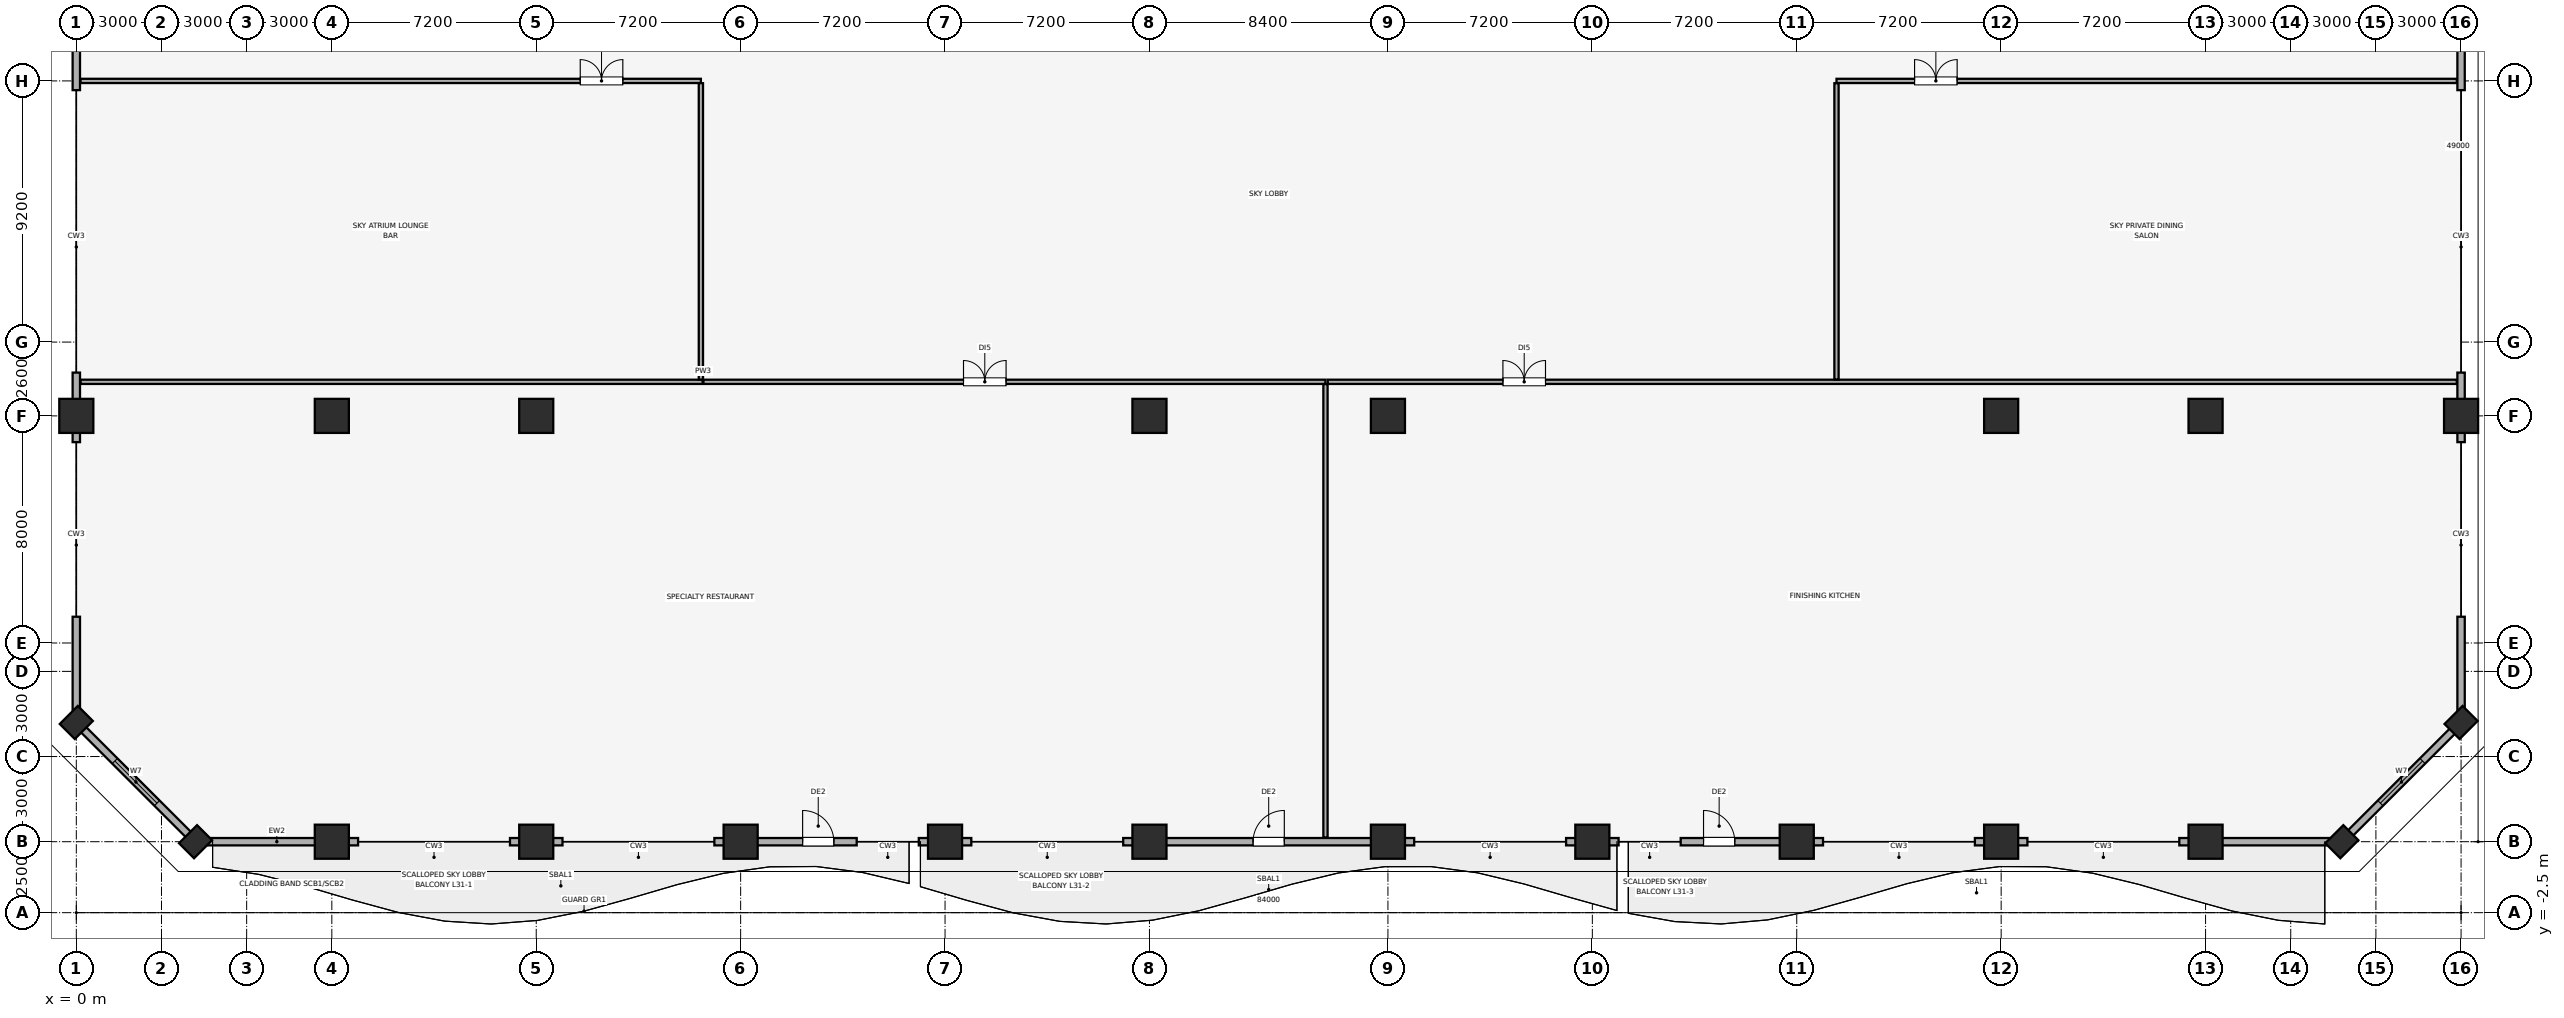
"""IFC4 building model, lengths in metres.
Left out: names, types, materials, properties, quantities, classifications, styles, units other than length and angle.
Written with IfcOpenShell. Run it as: python <this file> out.ifc"""

import sys

from ifc_helpers import new_model, si_unit, direction, frame, frame_2d, origin, origin_2d, place, context, subcontext, project, spatial, rectangle, extrude, element, fill, save


model = new_model("IFC4")
c1 = context("Model", 3, precision=1e-05, world=origin(), true_north=direction((0.0, 1.0)))
c2 = subcontext(c1, "Body", "Model", "MODEL_VIEW")
j1 = project(units=[si_unit("LENGTHUNIT", "METRE"), si_unit("PLANEANGLEUNIT", "RADIAN")], contexts=[c1])
p1 = place(None, origin())
s1 = spatial("IfcSite", under=j1, at=p1, CompositionType="ELEMENT")
p2 = place(p1, origin())
s2 = spatial("IfcBuilding", under=s1, at=p2, CompositionType="ELEMENT")
p3 = place(p2, frame((0.0, 0.0, 130.55)))
s3 = spatial("IfcBuildingStorey", under=s2, at=p3, CompositionType="ELEMENT", Elevation=130.55)
for number, where, z_axis, x_axis in (
    (1, (9.0, 0.0, 0.0), (0.0, 0.0, 1.0), (1.0, 0.0, 0.0)),
    (2, (16.2, 0.0, 0.0), (0.0, 0.0, 1.0), (1.0, 0.0, 0.0)),
    (3, (23.4, 0.0, 0.0), (0.0, 0.0, 1.0), (1.0, 0.0, 0.0)),
    (4, (30.6, 0.0, 0.0), (0.0, 0.0, 1.0), (1.0, 0.0, 0.0)),
    (5, (37.8, 0.0, 0.0), (0.0, 0.0, 1.0), (1.0, 0.0, 0.0)),
    (6, (46.2, 0.0, 0.0), (0.0, 0.0, 1.0), (1.0, 0.0, 0.0)),
    (7, (53.4, 0.0, 0.0), (0.0, 0.0, 1.0), (1.0, 0.0, 0.0)),
    (8, (60.6, 0.0, 0.0), (0.0, 0.0, 1.0), (1.0, 0.0, 0.0)),
    (9, (67.8, 0.0, 0.0), (0.0, 0.0, 1.0), (1.0, 0.0, 0.0)),
    (10, (75.0, 0.0, 0.0), (0.0, 0.0, 1.0), (1.0, 0.0, 0.0)),
    (11, (0.0, 15.0, 0.0), (0.0, 0.0, 1.0), (1.0, 0.0, 0.0)),
    (12, (84.0, 15.0, 0.0), (0.0, 0.0, 1.0), (1.0, 0.0, 0.0)),
):
    element("IfcColumn", number, at=place(p3, frame(where, z_axis=z_axis, x_axis=x_axis)), inside=s3, PredefinedType="COLUMN", context=c2, shape_type="SweptSolid", body=[
        extrude(rectangle(XDim=1.2, YDim=1.2, at=origin_2d()), origin(), (0.0, 0.0, 1.0), 4.56),
    ])
for number, where, z_axis, x_axis in (
    (13, (4.2, 0.0, 0.0), (0.0, 0.0, 1.0), (0.707, 0.707, 0.0)),
    (14, (79.8, 0.0, 0.0), (0.0, 0.0, 1.0), (0.707, 0.707, 0.0)),
    (15, (84.0, 4.2, 0.0), (0.0, 0.0, 1.0), (0.707, 0.707, 0.0)),
    (16, (0.0, 4.2, 0.0), (0.0, 0.0, 1.0), (0.707, 0.707, 0.0)),
):
    element("IfcColumn", number, at=place(p3, frame(where, z_axis=z_axis, x_axis=x_axis)), inside=s3, PredefinedType="PILASTER", context=c2, shape_type="SweptSolid", body=[
        extrude(rectangle(XDim=0.9, YDim=0.75, at=origin_2d()), origin(), (0.0, 0.0, 1.0), 4.56),
    ])
for number, where, z_axis, x_axis in (
    (17, (9.0, 15.0, 0.0), (0.0, 0.0, 1.0), (1.0, 0.0, 0.0)),
    (18, (16.2, 15.0, 0.0), (0.0, 0.0, 1.0), (1.0, 0.0, 0.0)),
    (19, (37.8, 15.0, 0.0), (0.0, 0.0, 1.0), (1.0, 0.0, 0.0)),
    (20, (46.2, 15.0, 0.0), (0.0, 0.0, 1.0), (1.0, 0.0, 0.0)),
    (21, (67.8, 15.0, 0.0), (0.0, 0.0, 1.0), (1.0, 0.0, 0.0)),
    (22, (75.0, 15.0, 0.0), (0.0, 0.0, 1.0), (1.0, 0.0, 0.0)),
):
    element("IfcColumn", number, at=place(p3, frame(where, z_axis=z_axis, x_axis=x_axis)), inside=s3, PredefinedType="COLUMN", context=c2, shape_type="SweptSolid", body=[
        extrude(rectangle(XDim=1.2, YDim=1.2, at=origin_2d()), origin(), (0.0, 0.0, 1.0), 4.56),
    ])
p4 = place(p3, frame((4.2, 0.0, 0.0), z_axis=(0.0, 0.0, 1.0), x_axis=(1.0, 0.0, 0.0)))
e23 = element("IfcWall", 23, at=p4, inside=s3, PredefinedType="SOLIDWALL", context=c2, shape_type="SweptSolid", body=[
    extrude(rectangle(XDim=5.725, YDim=0.26, at=frame_2d((2.863, 0.0))), origin(), (0.0, 0.0, 1.0), 3.4),
])
p5 = place(p3, frame((15.275, 0.0, 0.0), z_axis=(0.0, 0.0, 1.0), x_axis=(1.0, 0.0, 0.0)))
e24 = element("IfcWall", 24, at=p5, inside=s3, PredefinedType="SOLIDWALL", context=c2, shape_type="SweptSolid", body=[
    extrude(rectangle(XDim=1.85, YDim=0.26, at=frame_2d((0.925, 0.0))), origin(), (0.0, 0.0, 1.0), 4.52),
])
p6 = place(p3, frame((22.475, 0.0, 0.0), z_axis=(0.0, 0.0, 1.0), x_axis=(1.0, 0.0, 0.0)))
e25 = element("IfcWall", 25, at=p6, inside=s3, PredefinedType="SOLIDWALL", context=c2, shape_type="SweptSolid", body=[
    extrude(rectangle(XDim=5.013, YDim=0.26, at=frame_2d((2.507, 0.0))), origin(), (0.0, 0.0, 1.0), 3.4),
])
p7 = place(p6, frame((3.108, 0.0, 0.0)))
e26 = element("IfcOpeningElement", 26, at=p7, cuts=e25, PredefinedType="OPENING", context=c2, shape_type="SweptSolid", body=[
    extrude(rectangle(XDim=1.1, YDim=2.15, at=frame_2d((0.55, 1.075))), frame((0.0, 0.14, 0.0), z_axis=(0.0, -1.0, 0.0), x_axis=(1.0, 0.0, 0.0)), (0.0, 0.0, 1.0), 0.28),
])
p8 = place(p3, frame((29.675, 0.0, 0.0), z_axis=(0.0, 0.0, 1.0), x_axis=(1.0, 0.0, 0.0)))
e27 = element("IfcWall", 27, at=p8, inside=s3, PredefinedType="SOLIDWALL", context=c2, shape_type="SweptSolid", body=[
    extrude(rectangle(XDim=1.85, YDim=0.26, at=frame_2d((0.925, 0.0))), origin(), (0.0, 0.0, 1.0), 4.52),
])
p9 = place(p3, frame((36.875, 0.0, 0.0), z_axis=(0.0, 0.0, 1.0), x_axis=(1.0, 0.0, 0.0)))
e28 = element("IfcWall", 28, at=p9, inside=s3, PredefinedType="SOLIDWALL", context=c2, shape_type="SweptSolid", body=[
    extrude(rectangle(XDim=10.25, YDim=0.26, at=frame_2d((5.125, 0.0))), origin(), (0.0, 0.0, 1.0), 3.4),
])
p10 = place(p9, frame((4.575, 0.0, 0.0)))
e29 = element("IfcOpeningElement", 29, at=p10, cuts=e28, PredefinedType="OPENING", context=c2, shape_type="SweptSolid", body=[
    extrude(rectangle(XDim=1.1, YDim=2.15, at=frame_2d((0.55, 1.075))), frame((0.0, 0.14, 0.0), z_axis=(0.0, -1.0, 0.0), x_axis=(1.0, 0.0, 0.0)), (0.0, 0.0, 1.0), 0.28),
])
p11 = place(p3, frame((52.475, 0.0, 0.0), z_axis=(0.0, 0.0, 1.0), x_axis=(1.0, 0.0, 0.0)))
e30 = element("IfcWall", 30, at=p11, inside=s3, PredefinedType="SOLIDWALL", context=c2, shape_type="SweptSolid", body=[
    extrude(rectangle(XDim=1.85, YDim=0.26, at=frame_2d((0.925, 0.0))), origin(), (0.0, 0.0, 1.0), 4.52),
])
p12 = place(p3, frame((56.512, 0.0, 0.0), z_axis=(0.0, 0.0, 1.0), x_axis=(1.0, 0.0, 0.0)))
e31 = element("IfcWall", 31, at=p12, inside=s3, PredefinedType="SOLIDWALL", context=c2, shape_type="SweptSolid", body=[
    extrude(rectangle(XDim=5.013, YDim=0.26, at=frame_2d((2.507, 0.0))), origin(), (0.0, 0.0, 1.0), 3.4),
])
p13 = place(p12, frame((0.805, 0.0, 0.0)))
e32 = element("IfcOpeningElement", 32, at=p13, cuts=e31, PredefinedType="OPENING", context=c2, shape_type="SweptSolid", body=[
    extrude(rectangle(XDim=1.1, YDim=2.15, at=frame_2d((0.55, 1.075))), frame((0.0, 0.14, 0.0), z_axis=(0.0, -1.0, 0.0), x_axis=(1.0, 0.0, 0.0)), (0.0, 0.0, 1.0), 0.28),
])
p14 = place(p3, frame((66.875, 0.0, 0.0), z_axis=(0.0, 0.0, 1.0), x_axis=(1.0, 0.0, 0.0)))
e33 = element("IfcWall", 33, at=p14, inside=s3, PredefinedType="SOLIDWALL", context=c2, shape_type="SweptSolid", body=[
    extrude(rectangle(XDim=1.85, YDim=0.26, at=frame_2d((0.925, 0.0))), origin(), (0.0, 0.0, 1.0), 4.52),
])
p15 = place(p3, frame((74.075, 0.0, 0.0), z_axis=(0.0, 0.0, 1.0), x_axis=(1.0, 0.0, 0.0)))
e34 = element("IfcWall", 34, at=p15, inside=s3, PredefinedType="SOLIDWALL", context=c2, shape_type="SweptSolid", body=[
    extrude(rectangle(XDim=5.725, YDim=0.26, at=frame_2d((2.863, 0.0))), origin(), (0.0, 0.0, 1.0), 3.4),
])
p16 = place(p3, frame((79.8, 0.0, 0.0), z_axis=(0.0, 0.0, 1.0), x_axis=(0.707106781187, 0.707106781187, 0.0)))
e35 = element("IfcWall", 35, at=p16, inside=s3, PredefinedType="SOLIDWALL", context=c2, shape_type="SweptSolid", body=[
    extrude(rectangle(XDim=5.94, YDim=0.26, at=frame_2d((2.97, 0.0))), origin(), (0.0, 0.0, 1.0), 4.52),
])
p17 = place(p16, frame((1.92, 0.0, 0.85)))
e36 = element("IfcOpeningElement", 36, at=p17, cuts=e35, PredefinedType="OPENING", context=c2, shape_type="SweptSolid", body=[
    extrude(rectangle(XDim=2.1, YDim=1.6, at=frame_2d((1.05, 0.8))), frame((0.0, 0.14, 0.0), z_axis=(0.0, -1.0, 0.0), x_axis=(1.0, 0.0, 0.0)), (0.0, 0.0, 1.0), 0.28),
])
p18 = place(p3, frame((84.0, 4.2, 0.0), z_axis=(0.0, 0.0, 1.0), x_axis=(0.0, 1.0, 0.0)))
e37 = element("IfcWall", 37, at=p18, inside=s3, PredefinedType="SOLIDWALL", context=c2, shape_type="SweptSolid", body=[
    extrude(rectangle(XDim=3.725, YDim=0.26, at=frame_2d((1.863, 0.0))), origin(), (0.0, 0.0, 1.0), 4.52),
])
p19 = place(p3, frame((84.0, 14.075, 0.0), z_axis=(0.0, 0.0, 1.0), x_axis=(0.0, 1.0, 0.0)))
e38 = element("IfcWall", 38, at=p19, inside=s3, PredefinedType="SOLIDWALL", context=c2, shape_type="SweptSolid", body=[
    extrude(rectangle(XDim=2.45, YDim=0.26, at=frame_2d((1.225, 0.0))), origin(), (0.0, 0.0, 1.0), 4.52),
])
for number, where, z_axis, x_axis in (
    (39, (84.0, 26.475, 0.0), (0.0, 0.0, 1.0), (0.0, 1.0, 0.0)),
    (40, (0.0, 30.325, 0.0), (0.0, 0.0, 1.0), (0.0, -1.0, 0.0)),
):
    element("IfcWall", number, at=place(p3, frame(where, z_axis=z_axis, x_axis=x_axis)), inside=s3, PredefinedType="SOLIDWALL", context=c2, shape_type="SweptSolid", body=[
        extrude(rectangle(XDim=3.85, YDim=0.26, at=frame_2d((1.925, 0.0))), origin(), (0.0, 0.0, 1.0), 4.52),
    ])
p20 = place(p3, frame((0.0, 16.525, 0.0), z_axis=(0.0, 0.0, 1.0), x_axis=(0.0, -1.0, 0.0)))
e41 = element("IfcWall", 41, at=p20, inside=s3, PredefinedType="SOLIDWALL", context=c2, shape_type="SweptSolid", body=[
    extrude(rectangle(XDim=2.45, YDim=0.26, at=frame_2d((1.225, 0.0))), origin(), (0.0, 0.0, 1.0), 4.52),
])
p21 = place(p3, frame((0.0, 7.925, 0.0), z_axis=(0.0, 0.0, 1.0), x_axis=(0.0, -1.0, 0.0)))
e42 = element("IfcWall", 42, at=p21, inside=s3, PredefinedType="SOLIDWALL", context=c2, shape_type="SweptSolid", body=[
    extrude(rectangle(XDim=3.725, YDim=0.26, at=frame_2d((1.863, 0.0))), origin(), (0.0, 0.0, 1.0), 4.52),
])
p22 = place(p3, frame((0.0, 4.2, 0.0), z_axis=(0.0, 0.0, 1.0), x_axis=(0.707106781187, -0.707106781187, 0.0)))
e43 = element("IfcWall", 43, at=p22, inside=s3, PredefinedType="SOLIDWALL", context=c2, shape_type="SweptSolid", body=[
    extrude(rectangle(XDim=5.94, YDim=0.26, at=frame_2d((2.97, 0.0))), origin(), (0.0, 0.0, 1.0), 4.52),
])
p23 = place(p22, frame((1.92, 0.0, 0.85)))
e44 = element("IfcOpeningElement", 44, at=p23, cuts=e43, PredefinedType="OPENING", context=c2, shape_type="SweptSolid", body=[
    extrude(rectangle(XDim=2.1, YDim=1.6, at=frame_2d((1.05, 0.8))), frame((0.0, 0.14, 0.0), z_axis=(0.0, -1.0, 0.0), x_axis=(1.0, 0.0, 0.0)), (0.0, 0.0, 1.0), 0.28),
])
p24 = place(p3, frame((0.15, 16.2, 0.0), z_axis=(0.0, 0.0, 1.0), x_axis=(1.0, 0.0, 0.0)))
e45 = element("IfcWall", 45, at=p24, inside=s3, PredefinedType="PARTITIONING", context=c2, shape_type="SweptSolid", body=[
    extrude(rectangle(XDim=43.85, YDim=0.15, at=frame_2d((21.925, 0.0))), origin(), (0.0, 0.0, 1.0), 4.52),
])
p25 = place(p24, frame((31.1, 0.0, 0.0)))
e46 = element("IfcOpeningElement", 46, at=p25, cuts=e45, PredefinedType="OPENING", context=c2, shape_type="SweptSolid", body=[
    extrude(rectangle(XDim=1.5, YDim=2.25, at=frame_2d((0.75, 1.125))), frame((0.0, 0.085, 0.0), z_axis=(0.0, -1.0, 0.0), x_axis=(1.0, 0.0, 0.0)), (0.0, 0.0, 1.0), 0.17),
])
p26 = place(p3, frame((44.0, 0.15, 0.0), z_axis=(0.0, 0.0, 1.0), x_axis=(0.0, 1.0, 0.0)))
e47 = element("IfcWall", 47, at=p26, inside=s3, PredefinedType="PARTITIONING", context=c2, shape_type="SweptSolid", body=[
    extrude(rectangle(XDim=15.97, YDim=0.15, at=frame_2d((7.985, 0.0))), origin(), (0.0, 0.0, 1.0), 4.52),
])
p27 = place(p3, frame((44.08, 16.2, 0.0), z_axis=(0.0, 0.0, 1.0), x_axis=(1.0, 0.0, 0.0)))
e48 = element("IfcWall", 48, at=p27, inside=s3, PredefinedType="PARTITIONING", context=c2, shape_type="SweptSolid", body=[
    extrude(rectangle(XDim=39.77, YDim=0.15, at=frame_2d((19.885, 0.0))), origin(), (0.0, 0.0, 1.0), 4.52),
])
p28 = place(p27, frame((6.17, 0.0, 0.0)))
e49 = element("IfcOpeningElement", 49, at=p28, cuts=e48, PredefinedType="OPENING", context=c2, shape_type="SweptSolid", body=[
    extrude(rectangle(XDim=1.5, YDim=2.25, at=frame_2d((0.75, 1.125))), frame((0.0, 0.085, 0.0), z_axis=(0.0, -1.0, 0.0), x_axis=(1.0, 0.0, 0.0)), (0.0, 0.0, 1.0), 0.17),
])
p29 = place(p3, frame((0.15, 26.8, 0.0), z_axis=(0.0, 0.0, 1.0), x_axis=(1.0, 0.0, 0.0)))
e50 = element("IfcWall", 50, at=p29, inside=s3, PredefinedType="PARTITIONING", context=c2, shape_type="SweptSolid", body=[
    extrude(rectangle(XDim=21.85, YDim=0.15, at=frame_2d((10.925, 0.0))), origin(), (0.0, 0.0, 1.0), 4.52),
])
p30 = place(p29, frame((17.6, 0.0, 0.0)))
e51 = element("IfcOpeningElement", 51, at=p30, cuts=e50, PredefinedType="OPENING", context=c2, shape_type="SweptSolid", body=[
    extrude(rectangle(XDim=1.5, YDim=2.25, at=frame_2d((0.75, 1.125))), frame((0.0, 0.085, 0.0), z_axis=(0.0, -1.0, 0.0), x_axis=(1.0, 0.0, 0.0)), (0.0, 0.0, 1.0), 0.17),
])
p31 = place(p3, frame((22.0, 16.28, 0.0), z_axis=(0.0, 0.0, 1.0), x_axis=(0.0, 1.0, 0.0)))
e52 = element("IfcWall", 52, at=p31, inside=s3, PredefinedType="PARTITIONING", context=c2, shape_type="SweptSolid", body=[
    extrude(rectangle(XDim=10.44, YDim=0.15, at=frame_2d((5.22, 0.0))), origin(), (0.0, 0.0, 1.0), 4.52),
])
p32 = place(p3, frame((62.0, 26.8, 0.0), z_axis=(0.0, 0.0, 1.0), x_axis=(1.0, 0.0, 0.0)))
e53 = element("IfcWall", 53, at=p32, inside=s3, PredefinedType="PARTITIONING", context=c2, shape_type="SweptSolid", body=[
    extrude(rectangle(XDim=21.85, YDim=0.15, at=frame_2d((10.925, 0.0))), origin(), (0.0, 0.0, 1.0), 4.52),
])
p33 = place(p32, frame((2.75, 0.0, 0.0)))
e54 = element("IfcOpeningElement", 54, at=p33, cuts=e53, PredefinedType="OPENING", context=c2, shape_type="SweptSolid", body=[
    extrude(rectangle(XDim=1.5, YDim=2.25, at=frame_2d((0.75, 1.125))), frame((0.0, 0.085, 0.0), z_axis=(0.0, -1.0, 0.0), x_axis=(1.0, 0.0, 0.0)), (0.0, 0.0, 1.0), 0.17),
])
p34 = place(p3, frame((62.0, 16.28, 0.0), z_axis=(0.0, 0.0, 1.0), x_axis=(0.0, 1.0, 0.0)))
e55 = element("IfcWall", 55, at=p34, inside=s3, PredefinedType="PARTITIONING", context=c2, shape_type="SweptSolid", body=[
    extrude(rectangle(XDim=10.44, YDim=0.15, at=frame_2d((5.22, 0.0))), origin(), (0.0, 0.0, 1.0), 4.52),
])
p35 = place(p17, origin())
e56 = element("IfcWindow", 56, at=p35, inside=s3, PartitioningType="SINGLE_PANEL", PredefinedType="WINDOW", context=c2, shape_type="SweptSolid", body=[
    extrude(rectangle(XDim=2.1, YDim=1.6, at=frame_2d((1.05, 0.8))), frame((0.0, 0.03, 0.0), z_axis=(0.0, -1.0, 0.0), x_axis=(1.0, 0.0, 0.0)), (0.0, 0.0, 1.0), 0.06),
])
fill(e36, e56)
p36 = place(p23, origin())
e57 = element("IfcWindow", 57, at=p36, inside=s3, PartitioningType="SINGLE_PANEL", PredefinedType="WINDOW", context=c2, shape_type="SweptSolid", body=[
    extrude(rectangle(XDim=2.1, YDim=1.6, at=frame_2d((1.05, 0.8))), frame((0.0, 0.03, 0.0), z_axis=(0.0, -1.0, 0.0), x_axis=(1.0, 0.0, 0.0)), (0.0, 0.0, 1.0), 0.06),
])
fill(e44, e57)
p37 = place(p7, origin())
e58 = element("IfcDoor", 58, at=p37, inside=s3, OperationType="SINGLE_SWING_LEFT", PredefinedType="DOOR", context=c2, shape_type="SweptSolid", body=[
    extrude(rectangle(XDim=1.1, YDim=2.15, at=frame_2d((0.55, 1.075))), frame((0.0, 0.025, 0.0), z_axis=(0.0, -1.0, 0.0), x_axis=(1.0, 0.0, 0.0)), (0.0, 0.0, 1.0), 0.05),
])
fill(e26, e58)
p38 = place(p10, origin())
e59 = element("IfcDoor", 59, at=p38, inside=s3, OperationType="SINGLE_SWING_RIGHT", PredefinedType="DOOR", context=c2, shape_type="SweptSolid", body=[
    extrude(rectangle(XDim=1.1, YDim=2.15, at=frame_2d((0.55, 1.075))), frame((0.0, 0.025, 0.0), z_axis=(0.0, -1.0, 0.0), x_axis=(1.0, 0.0, 0.0)), (0.0, 0.0, 1.0), 0.05),
])
fill(e29, e59)
p39 = place(p13, origin())
e60 = element("IfcDoor", 60, at=p39, inside=s3, OperationType="SINGLE_SWING_LEFT", PredefinedType="DOOR", context=c2, shape_type="SweptSolid", body=[
    extrude(rectangle(XDim=1.1, YDim=2.15, at=frame_2d((0.55, 1.075))), frame((0.0, 0.025, 0.0), z_axis=(0.0, -1.0, 0.0), x_axis=(1.0, 0.0, 0.0)), (0.0, 0.0, 1.0), 0.05),
])
fill(e32, e60)
p40 = place(p25, origin())
e61 = element("IfcDoor", 61, at=p40, inside=s3, OperationType="DOUBLE_DOOR_SINGLE_SWING", PredefinedType="DOOR", context=c2, shape_type="SweptSolid", body=[
    extrude(rectangle(XDim=1.5, YDim=2.25, at=frame_2d((0.75, 1.125))), frame((0.0, 0.025, 0.0), z_axis=(0.0, -1.0, 0.0), x_axis=(1.0, 0.0, 0.0)), (0.0, 0.0, 1.0), 0.05),
])
fill(e46, e61)
p41 = place(p28, origin())
e62 = element("IfcDoor", 62, at=p41, inside=s3, OperationType="DOUBLE_DOOR_SINGLE_SWING", PredefinedType="DOOR", context=c2, shape_type="SweptSolid", body=[
    extrude(rectangle(XDim=1.5, YDim=2.25, at=frame_2d((0.75, 1.125))), frame((0.0, 0.025, 0.0), z_axis=(0.0, -1.0, 0.0), x_axis=(1.0, 0.0, 0.0)), (0.0, 0.0, 1.0), 0.05),
])
fill(e49, e62)
p42 = place(p30, origin())
e63 = element("IfcDoor", 63, at=p42, inside=s3, OperationType="DOUBLE_DOOR_SINGLE_SWING", PredefinedType="DOOR", context=c2, shape_type="SweptSolid", body=[
    extrude(rectangle(XDim=1.5, YDim=2.25, at=frame_2d((0.75, 1.125))), frame((0.0, 0.025, 0.0), z_axis=(0.0, -1.0, 0.0), x_axis=(1.0, 0.0, 0.0)), (0.0, 0.0, 1.0), 0.05),
])
fill(e51, e63)
p43 = place(p33, origin())
e64 = element("IfcDoor", 64, at=p43, inside=s3, OperationType="DOUBLE_DOOR_SINGLE_SWING", PredefinedType="DOOR", context=c2, shape_type="SweptSolid", body=[
    extrude(rectangle(XDim=1.5, YDim=2.25, at=frame_2d((0.75, 1.125))), frame((0.0, 0.025, 0.0), z_axis=(0.0, -1.0, 0.0), x_axis=(1.0, 0.0, 0.0)), (0.0, 0.0, 1.0), 0.05),
])
fill(e54, e64)
save(model, sys.argv[1])
